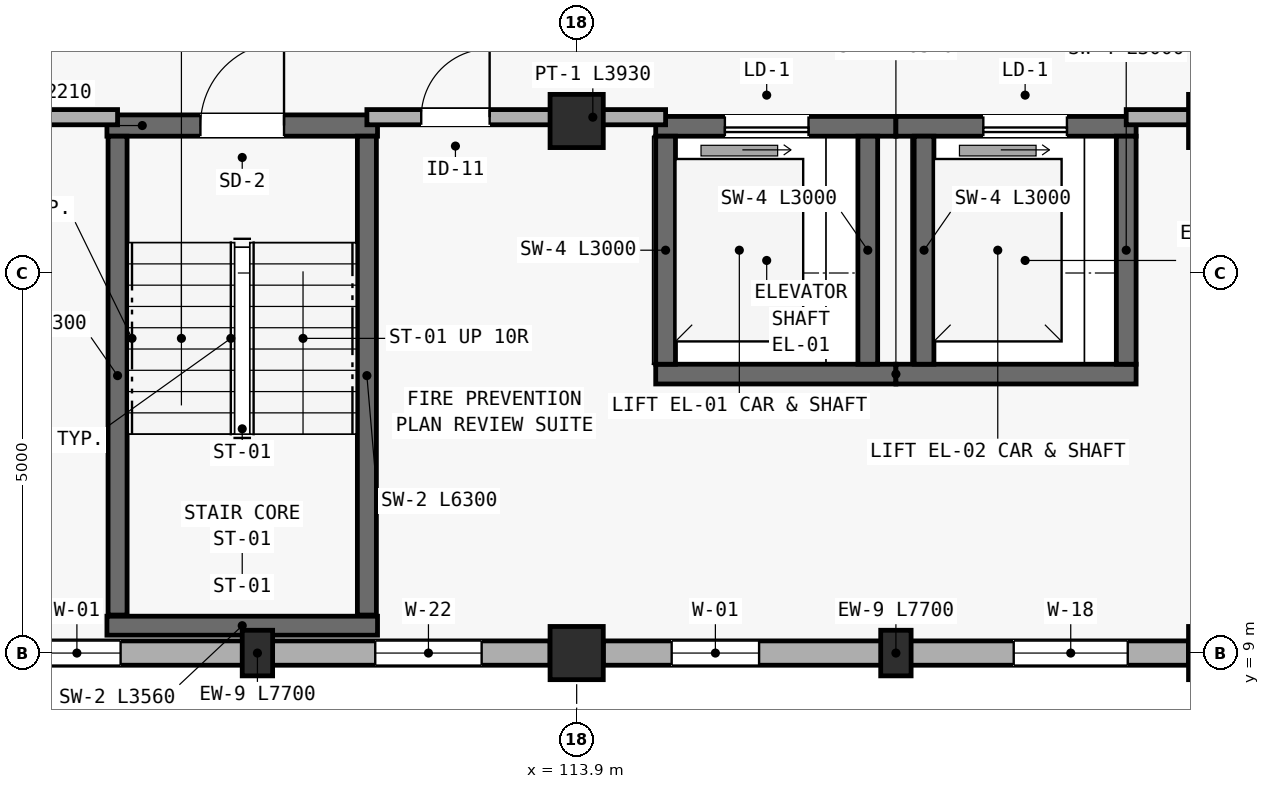
"""IFC4 building model, lengths in metres.
Left out: names, types, materials, properties, quantities, classifications, styles, units other than length and angle.
Written with IfcOpenShell. Run it as: python <this file> out.ifc"""

import sys

from ifc_helpers import new_model, si_unit, direction, frame, frame_2d, origin, origin_2d, place, context, subcontext, project, spatial, rectangle, extrude, element, fill, save


model = new_model("IFC4")
c1 = context("Model", 3, precision=1e-05, world=origin(), true_north=direction((0.0, 1.0)))
c2 = subcontext(c1, "Body", "Model", "MODEL_VIEW")
j1 = project(units=[si_unit("LENGTHUNIT", "METRE"), si_unit("PLANEANGLEUNIT", "RADIAN")], contexts=[c1])
p1 = place(None, origin())
s1 = spatial("IfcSite", under=j1, at=p1, CompositionType="ELEMENT")
p2 = place(p1, origin())
s2 = spatial("IfcBuilding", under=s1, at=p2, CompositionType="ELEMENT")
p3 = place(p2, frame((0.0, 0.0, 5.85)))
s3 = spatial("IfcBuildingStorey", under=s2, at=p3, CompositionType="ELEMENT", Elevation=5.85)
for number, where, z_axis, x_axis in (
    (1, (113.9, 9.0, 0.0), (0.0, 0.0, 1.0), (1.0, 0.0, 0.0)),
    (2, (113.9, 16.0, 0.0), (0.0, 0.0, 1.0), (1.0, 0.0, 0.0)),
    (3, (122.3, 9.0, 0.0), (0.0, 0.0, 1.0), (1.0, 0.0, 0.0)),
    (4, (122.3, 16.0, 0.0), (0.0, 0.0, 1.0), (1.0, 0.0, 0.0)),
):
    element("IfcColumn", number, at=place(p3, frame(where, z_axis=z_axis, x_axis=x_axis)), inside=s3, PredefinedType="COLUMN", context=c2, shape_type="SweptSolid", body=[
        extrude(rectangle(XDim=0.7, YDim=0.7, at=origin_2d()), origin(), (0.0, 0.0, 1.0), 3.45),
    ])
for number, where, z_axis, x_axis in (
    (5, (109.7, 9.0, 0.0), (0.0, 0.0, 1.0), (1.0, 0.0, 0.0)),
    (6, (118.1, 9.0, 0.0), (0.0, 0.0, 1.0), (1.0, 0.0, 0.0)),
):
    element("IfcColumn", number, at=place(p3, frame(where, z_axis=z_axis, x_axis=x_axis)), inside=s3, PredefinedType="PILASTER", context=c2, shape_type="SweptSolid", body=[
        extrude(rectangle(XDim=0.4, YDim=0.6, at=origin_2d()), origin(), (0.0, 0.0, 1.0), 3.45),
    ])
p4 = place(p3, frame((105.85, 9.0, 0.0), z_axis=(0.0, 0.0, 1.0), x_axis=(1.0, 0.0, 0.0)))
e7 = element("IfcWall", 7, at=p4, inside=s3, PredefinedType="STANDARD", context=c2, shape_type="SweptSolid", body=[
    extrude(rectangle(XDim=7.7, YDim=0.32, at=frame_2d((3.85, 0.0))), origin(), (0.0, 0.0, 1.0), 2.64),
])
p5 = place(p4, frame((0.9, 0.0, 0.75)))
e8 = element("IfcOpeningElement", 8, at=p5, cuts=e7, PredefinedType="OPENING", context=c2, shape_type="SweptSolid", body=[
    extrude(rectangle(XDim=1.15, YDim=1.45, at=frame_2d((0.575, 0.725))), frame((0.0, 0.17, 0.0), z_axis=(0.0, -1.0, 0.0), x_axis=(1.0, 0.0, 0.0)), (0.0, 0.0, 1.0), 0.34),
])
p6 = place(p4, frame((5.4, 0.0, 0.75)))
e9 = element("IfcOpeningElement", 9, at=p6, cuts=e7, PredefinedType="OPENING", context=c2, shape_type="SweptSolid", body=[
    extrude(rectangle(XDim=1.4, YDim=1.45, at=frame_2d((0.7, 0.725))), frame((0.0, 0.17, 0.0), z_axis=(0.0, -1.0, 0.0), x_axis=(1.0, 0.0, 0.0)), (0.0, 0.0, 1.0), 0.34),
])
p7 = place(p3, frame((114.25, 9.0, 0.0), z_axis=(0.0, 0.0, 1.0), x_axis=(1.0, 0.0, 0.0)))
e10 = element("IfcWall", 10, at=p7, inside=s3, PredefinedType="STANDARD", context=c2, shape_type="SweptSolid", body=[
    extrude(rectangle(XDim=7.7, YDim=0.32, at=frame_2d((3.85, 0.0))), origin(), (0.0, 0.0, 1.0), 2.64),
])
p8 = place(p7, frame((0.9, 0.0, 0.75)))
e11 = element("IfcOpeningElement", 11, at=p8, cuts=e10, PredefinedType="OPENING", context=c2, shape_type="SweptSolid", body=[
    extrude(rectangle(XDim=1.15, YDim=1.45, at=frame_2d((0.575, 0.725))), frame((0.0, 0.17, 0.0), z_axis=(0.0, -1.0, 0.0), x_axis=(1.0, 0.0, 0.0)), (0.0, 0.0, 1.0), 0.34),
])
p9 = place(p7, frame((5.4, 0.0, 0.75)))
e12 = element("IfcOpeningElement", 12, at=p9, cuts=e10, PredefinedType="OPENING", context=c2, shape_type="SweptSolid", body=[
    extrude(rectangle(XDim=1.5, YDim=1.4, at=frame_2d((0.75, 0.7))), frame((0.0, 0.17, 0.0), z_axis=(0.0, -1.0, 0.0), x_axis=(1.0, 0.0, 0.0)), (0.0, 0.0, 1.0), 0.34),
])
p10 = place(p3, frame((107.72, 15.94, 0.0), z_axis=(0.0, 0.0, 1.0), x_axis=(1.0, 0.0, 0.0)))
e13 = element("IfcWall", 13, at=p10, inside=s3, PredefinedType="SHEAR", context=c2, shape_type="SweptSolid", body=[
    extrude(rectangle(XDim=3.56, YDim=0.28, at=frame_2d((1.78, 0.0))), origin(), (0.0, 0.0, 1.0), 3.2),
])
p11 = place(p10, frame((1.23, 0.0, 0.0)))
e14 = element("IfcOpeningElement", 14, at=p11, cuts=e13, PredefinedType="OPENING", context=c2, shape_type="SweptSolid", body=[
    extrude(rectangle(XDim=1.1, YDim=2.15, at=frame_2d((0.55, 1.075))), frame((0.0, 0.15, 0.0), z_axis=(0.0, -1.0, 0.0), x_axis=(1.0, 0.0, 0.0)), (0.0, 0.0, 1.0), 0.3),
])
p12 = place(p3, frame((111.28, 9.36, 0.0), z_axis=(0.0, 0.0, 1.0), x_axis=(-1.0, 0.0, 0.0)))
e15 = element("IfcWall", 15, at=p12, inside=s3, PredefinedType="SHEAR", context=c2, shape_type="SweptSolid", body=[
    extrude(rectangle(XDim=3.56, YDim=0.25, at=frame_2d((1.78, 0.0))), origin(), (0.0, 0.0, 1.0), 3.2),
])
for number, where, z_axis, x_axis in (
    (16, (107.86, 15.8, 0.0), (0.0, 0.0, 1.0), (0.0, -1.0, 0.0)),
    (17, (111.14, 9.5, 0.0), (0.0, 0.0, 1.0), (0.0, 1.0, 0.0)),
):
    element("IfcWall", number, at=place(p3, frame(where, z_axis=z_axis, x_axis=x_axis)), inside=s3, PredefinedType="SHEAR", context=c2, shape_type="SweptSolid", body=[
        extrude(rectangle(XDim=6.3, YDim=0.25, at=frame_2d((3.15, 0.0))), origin(), (0.0, 0.0, 1.0), 3.2),
    ])
p13 = place(p3, frame((114.94, 12.67, 0.0), z_axis=(0.0, 0.0, 1.0), x_axis=(1.0, 0.0, 0.0)))
e18 = element("IfcWall", 18, at=p13, inside=s3, PredefinedType="SHEAR", context=c2, shape_type="SweptSolid", body=[
    extrude(rectangle(XDim=3.16, YDim=0.26, at=frame_2d((1.58, 0.0))), origin(), (0.0, 0.0, 1.0), 3.2),
])
p14 = place(p3, frame((118.1, 15.93, 0.0), z_axis=(0.0, 0.0, 1.0), x_axis=(-1.0, 0.0, 0.0)))
e19 = element("IfcWall", 19, at=p14, inside=s3, PredefinedType="SHEAR", context=c2, shape_type="SweptSolid", body=[
    extrude(rectangle(XDim=3.16, YDim=0.26, at=frame_2d((1.58, 0.0))), origin(), (0.0, 0.0, 1.0), 3.2),
])
p15 = place(p14, frame((1.15, 0.0, 0.0)))
e20 = element("IfcOpeningElement", 20, at=p15, cuts=e19, PredefinedType="OPENING", context=c2, shape_type="SweptSolid", body=[
    extrude(rectangle(XDim=1.1, YDim=2.15, at=frame_2d((0.55, 1.075))), frame((0.0, 0.14, 0.0), z_axis=(0.0, -1.0, 0.0), x_axis=(1.0, 0.0, 0.0)), (0.0, 0.0, 1.0), 0.28),
])
for number, where, z_axis, x_axis in (
    (21, (115.07, 15.8, 0.0), (0.0, 0.0, 1.0), (0.0, -1.0, 0.0)),
    (22, (117.73, 12.8, 0.0), (0.0, 0.0, 1.0), (0.0, 1.0, 0.0)),
):
    element("IfcWall", number, at=place(p3, frame(where, z_axis=z_axis, x_axis=x_axis)), inside=s3, PredefinedType="SHEAR", context=c2, shape_type="SweptSolid", body=[
        extrude(rectangle(XDim=3.0, YDim=0.26, at=frame_2d((1.5, 0.0))), origin(), (0.0, 0.0, 1.0), 3.2),
    ])
p16 = place(p3, frame((118.1, 12.67, 0.0), z_axis=(0.0, 0.0, 1.0), x_axis=(1.0, 0.0, 0.0)))
e23 = element("IfcWall", 23, at=p16, inside=s3, PredefinedType="SHEAR", context=c2, shape_type="SweptSolid", body=[
    extrude(rectangle(XDim=3.16, YDim=0.26, at=frame_2d((1.58, 0.0))), origin(), (0.0, 0.0, 1.0), 3.2),
])
p17 = place(p3, frame((121.26, 15.93, 0.0), z_axis=(0.0, 0.0, 1.0), x_axis=(-1.0, 0.0, 0.0)))
e24 = element("IfcWall", 24, at=p17, inside=s3, PredefinedType="SHEAR", context=c2, shape_type="SweptSolid", body=[
    extrude(rectangle(XDim=3.16, YDim=0.26, at=frame_2d((1.58, 0.0))), origin(), (0.0, 0.0, 1.0), 3.2),
])
p18 = place(p17, frame((0.91, 0.0, 0.0)))
e25 = element("IfcOpeningElement", 25, at=p18, cuts=e24, PredefinedType="OPENING", context=c2, shape_type="SweptSolid", body=[
    extrude(rectangle(XDim=1.1, YDim=2.15, at=frame_2d((0.55, 1.075))), frame((0.0, 0.14, 0.0), z_axis=(0.0, -1.0, 0.0), x_axis=(1.0, 0.0, 0.0)), (0.0, 0.0, 1.0), 0.28),
])
for number, where, z_axis, x_axis in (
    (26, (118.47, 15.8, 0.0), (0.0, 0.0, 1.0), (0.0, -1.0, 0.0)),
    (27, (121.13, 12.8, 0.0), (0.0, 0.0, 1.0), (0.0, 1.0, 0.0)),
):
    element("IfcWall", number, at=place(p3, frame(where, z_axis=z_axis, x_axis=x_axis)), inside=s3, PredefinedType="SHEAR", context=c2, shape_type="SweptSolid", body=[
        extrude(rectangle(XDim=3.0, YDim=0.26, at=frame_2d((1.5, 0.0))), origin(), (0.0, 0.0, 1.0), 3.2),
    ])
p19 = place(p3, frame((105.65, 16.05, 0.0), z_axis=(0.0, 0.0, 1.0), x_axis=(1.0, 0.0, 0.0)))
e28 = element("IfcWall", 28, at=p19, inside=s3, PredefinedType="PARTITIONING", context=c2, shape_type="SweptSolid", body=[
    extrude(rectangle(XDim=2.21, YDim=0.2, at=frame_2d((1.105, 0.0))), origin(), (0.0, 0.0, 1.0), 2.65),
])
p20 = place(p3, frame((111.14, 16.05, 0.0), z_axis=(0.0, 0.0, 1.0), x_axis=(1.0, 0.0, 0.0)))
e29 = element("IfcWall", 29, at=p20, inside=s3, PredefinedType="PARTITIONING", context=c2, shape_type="SweptSolid", body=[
    extrude(rectangle(XDim=3.93, YDim=0.2, at=frame_2d((1.965, 0.0))), origin(), (0.0, 0.0, 1.0), 2.65),
])
p21 = place(p20, frame((0.715, 0.0, 0.0)))
e30 = element("IfcOpeningElement", 30, at=p21, cuts=e29, PredefinedType="OPENING", context=c2, shape_type="SweptSolid", body=[
    extrude(rectangle(XDim=0.9, YDim=2.08, at=frame_2d((0.45, 1.04))), frame((0.0, 0.11, 0.0), z_axis=(0.0, -1.0, 0.0), x_axis=(1.0, 0.0, 0.0)), (0.0, 0.0, 1.0), 0.22),
])
p22 = place(p3, frame((121.13, 16.05, 0.0), z_axis=(0.0, 0.0, 1.0), x_axis=(1.0, 0.0, 0.0)))
e31 = element("IfcWall", 31, at=p22, inside=s3, PredefinedType="PARTITIONING", context=c2, shape_type="SweptSolid", body=[
    extrude(rectangle(XDim=3.73, YDim=0.2, at=frame_2d((1.865, 0.0))), origin(), (0.0, 0.0, 1.0), 2.65),
])
p23 = place(p5, origin())
e32 = element("IfcWindow", 32, at=p23, inside=s3, PartitioningType="SINGLE_PANEL", PredefinedType="WINDOW", context=c2, shape_type="SweptSolid", body=[
    extrude(rectangle(XDim=1.15, YDim=1.45, at=frame_2d((0.575, 0.725))), frame((0.0, 0.03, 0.0), z_axis=(0.0, -1.0, 0.0), x_axis=(1.0, 0.0, 0.0)), (0.0, 0.0, 1.0), 0.06),
])
fill(e8, e32)
p24 = place(p6, origin())
e33 = element("IfcWindow", 33, at=p24, inside=s3, PartitioningType="DOUBLE_PANEL_VERTICAL", PredefinedType="WINDOW", context=c2, shape_type="SweptSolid", body=[
    extrude(rectangle(XDim=1.4, YDim=1.45, at=frame_2d((0.7, 0.725))), frame((0.0, 0.03, 0.0), z_axis=(0.0, -1.0, 0.0), x_axis=(1.0, 0.0, 0.0)), (0.0, 0.0, 1.0), 0.06),
])
fill(e9, e33)
p25 = place(p8, origin())
e34 = element("IfcWindow", 34, at=p25, inside=s3, PartitioningType="SINGLE_PANEL", PredefinedType="WINDOW", context=c2, shape_type="SweptSolid", body=[
    extrude(rectangle(XDim=1.15, YDim=1.45, at=frame_2d((0.575, 0.725))), frame((0.0, 0.03, 0.0), z_axis=(0.0, -1.0, 0.0), x_axis=(1.0, 0.0, 0.0)), (0.0, 0.0, 1.0), 0.06),
])
fill(e11, e34)
p26 = place(p9, origin())
e35 = element("IfcWindow", 35, at=p26, inside=s3, PartitioningType="DOUBLE_PANEL_VERTICAL", PredefinedType="WINDOW", context=c2, shape_type="SweptSolid", body=[
    extrude(rectangle(XDim=1.5, YDim=1.4, at=frame_2d((0.75, 0.7))), frame((0.0, 0.03, 0.0), z_axis=(0.0, -1.0, 0.0), x_axis=(1.0, 0.0, 0.0)), (0.0, 0.0, 1.0), 0.06),
])
fill(e12, e35)
p27 = place(p11, origin())
e36 = element("IfcDoor", 36, at=p27, inside=s3, OperationType="SINGLE_SWING_RIGHT", PredefinedType="DOOR", context=c2, shape_type="SweptSolid", body=[
    extrude(rectangle(XDim=1.1, YDim=2.15, at=frame_2d((0.55, 1.075))), frame((0.0, 0.025, 0.0), z_axis=(0.0, -1.0, 0.0), x_axis=(1.0, 0.0, 0.0)), (0.0, 0.0, 1.0), 0.05),
])
fill(e14, e36)
p28 = place(p15, origin())
e37 = element("IfcDoor", 37, at=p28, inside=s3, OperationType="SLIDING_TO_LEFT", PredefinedType="DOOR", context=c2, shape_type="SweptSolid", body=[
    extrude(rectangle(XDim=1.1, YDim=2.15, at=frame_2d((0.55, 1.075))), frame((0.0, 0.025, 0.0), z_axis=(0.0, -1.0, 0.0), x_axis=(1.0, 0.0, 0.0)), (0.0, 0.0, 1.0), 0.05),
])
fill(e20, e37)
p29 = place(p18, origin())
e38 = element("IfcDoor", 38, at=p29, inside=s3, OperationType="SLIDING_TO_LEFT", PredefinedType="DOOR", context=c2, shape_type="SweptSolid", body=[
    extrude(rectangle(XDim=1.1, YDim=2.15, at=frame_2d((0.55, 1.075))), frame((0.0, 0.025, 0.0), z_axis=(0.0, -1.0, 0.0), x_axis=(1.0, 0.0, 0.0)), (0.0, 0.0, 1.0), 0.05),
])
fill(e25, e38)
p30 = place(p21, origin())
e39 = element("IfcDoor", 39, at=p30, inside=s3, OperationType="SINGLE_SWING_RIGHT", PredefinedType="DOOR", context=c2, shape_type="SweptSolid", body=[
    extrude(rectangle(XDim=0.9, YDim=2.08, at=frame_2d((0.45, 1.04))), frame((0.0, 0.025, 0.0), z_axis=(0.0, -1.0, 0.0), x_axis=(1.0, 0.0, 0.0)), (0.0, 0.0, 1.0), 0.05),
])
fill(e30, e39)
save(model, sys.argv[1])
